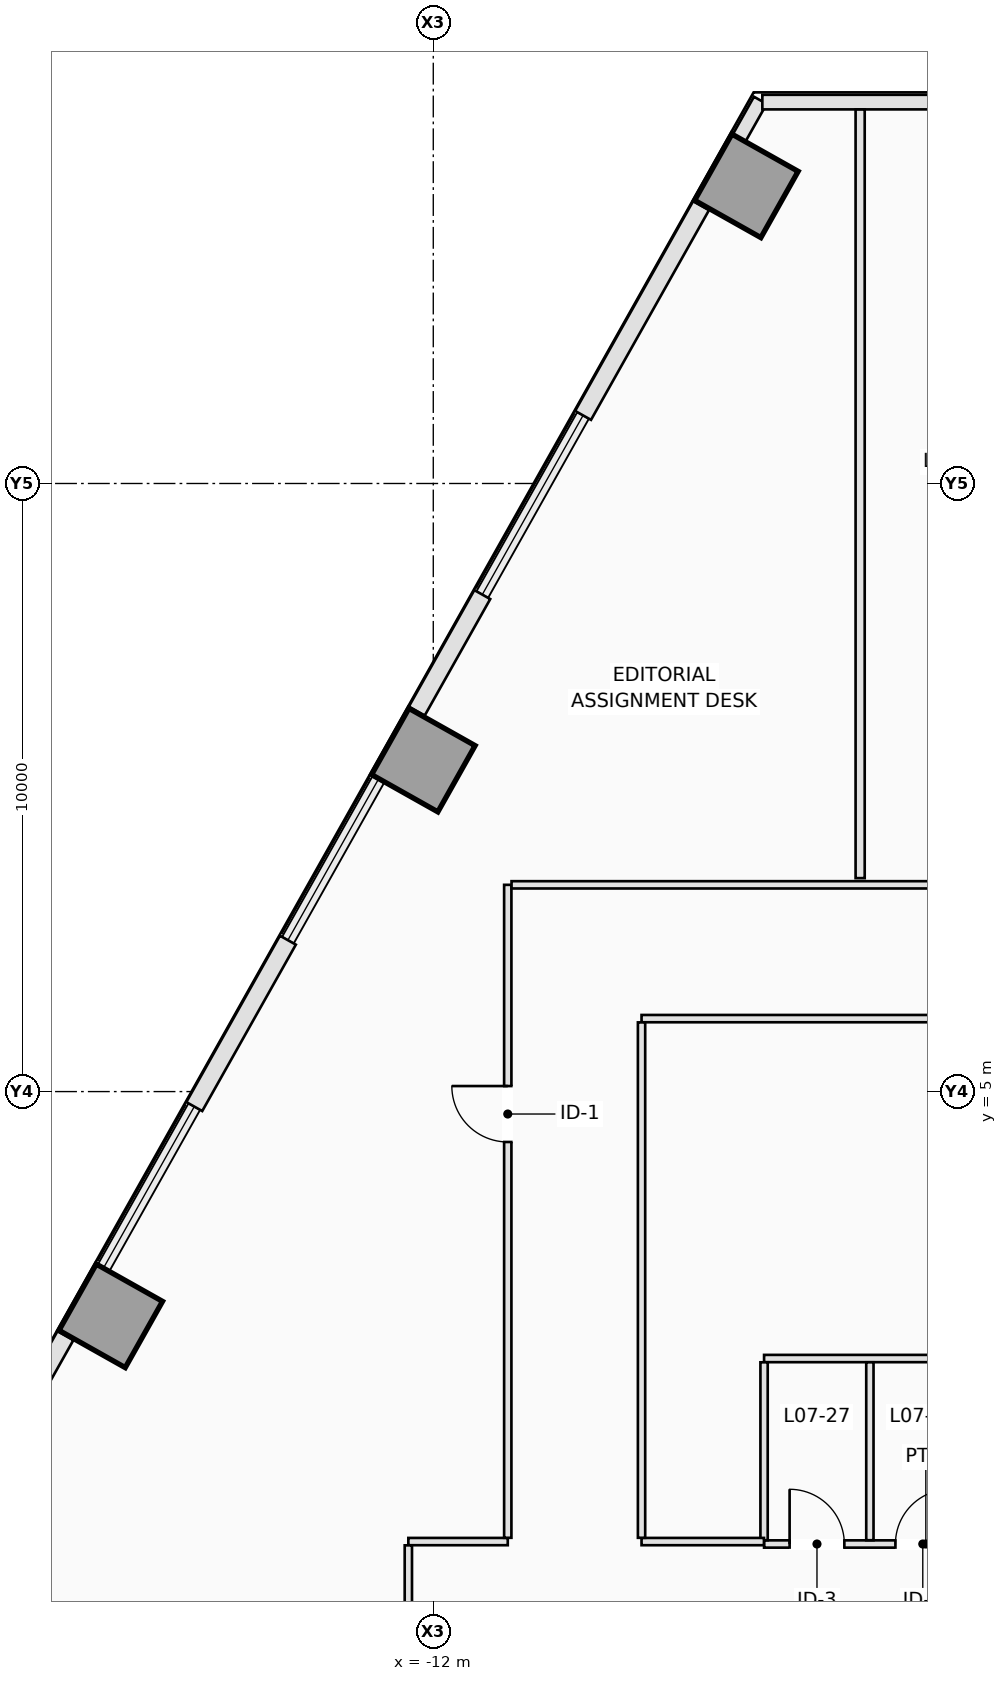
"""IFC4 building model, lengths in metres.
Left out: names, types, materials, properties, quantities, classifications, styles, units other than length and angle.
Written with IfcOpenShell. Run it as: python <this file> out.ifc"""

import sys

from ifc_helpers import new_model, si_unit, direction, frame, frame_2d, origin, origin_2d, place, context, subcontext, project, spatial, rectangle, extrude, element, fill, save


model = new_model("IFC4")
c1 = context("Model", 3, precision=1e-05, world=origin(), true_north=direction((0.0, 1.0)))
c2 = subcontext(c1, "Body", "Model", "MODEL_VIEW")
j1 = project(units=[si_unit("LENGTHUNIT", "METRE"), si_unit("PLANEANGLEUNIT", "RADIAN")], contexts=[c1])
p1 = place(None, origin())
s1 = spatial("IfcSite", under=j1, at=p1, CompositionType="ELEMENT")
p2 = place(p1, origin())
s2 = spatial("IfcBuilding", under=s1, at=p2, CompositionType="ELEMENT")
p3 = place(p2, frame((0.0, 0.0, 31.1)))
s3 = spatial("IfcBuildingStorey", under=s2, at=p3, CompositionType="ELEMENT", Elevation=31.1)
for number, where, z_axis, x_axis in (
    (1, (-6.851, 19.895, 0.0), (0.0, 0.0, 1.0), (-0.872, 0.49, 0.0)),
    (2, (-12.163, 10.451, 0.0), (0.0, 0.0, 1.0), (-0.872, 0.49, 0.0)),
    (3, (-17.304, 1.312, 0.0), (0.0, 0.0, 1.0), (-0.872, 0.49, 0.0)),
):
    element("IfcColumn", number, at=place(p3, frame(where, z_axis=z_axis, x_axis=x_axis)), inside=s3, PredefinedType="COLUMN", context=c2, shape_type="SweptSolid", body=[
        extrude(rectangle(XDim=1.25, YDim=1.25, at=origin_2d()), origin(), (0.0, 0.0, 1.0), 3.5),
    ])
p4 = place(p3, frame((-6.969, 20.684, 0.0), z_axis=(0.0, 0.0, 1.0), x_axis=(0.490261239633, 0.871575537125, 0.0)))
e4 = element("IfcWall", 4, at=p4, inside=s3, PredefinedType="STANDARD", context=c2, shape_type="SweptSolid", body=[
    extrude(rectangle(XDim=0.708, YDim=0.24, at=frame_2d((0.354, 0.0))), origin(), (0.0, 0.0, 1.0), 3.25),
])
p5 = place(p3, frame((-19.127, -0.93, 0.0), z_axis=(0.0, 0.0, 1.0), x_axis=(0.490277063651, 0.871566635925, 0.0)))
e5 = element("IfcWall", 5, at=p5, inside=s3, PredefinedType="STANDARD", context=c2, shape_type="SweptSolid", body=[
    extrude(rectangle(XDim=2.198, YDim=0.3, at=frame_2d((1.099, 0.0))), origin(), (0.0, 0.0, 1.0), 3.25),
])
p6 = place(p3, frame((-12.271, 11.258, 0.0), z_axis=(0.0, 0.0, 1.0), x_axis=(0.490324540864, 0.871539927156, 0.0)))
e6 = element("IfcWall", 6, at=p6, inside=s3, PredefinedType="STANDARD", context=c2, shape_type="SweptSolid", body=[
    extrude(rectangle(XDim=2.197, YDim=0.3, at=frame_2d((1.099, 0.0))), origin(), (0.0, 0.0, 1.0), 3.25),
])
p7 = place(p3, frame((-9.537, 16.12, 0.0), z_axis=(0.0, 0.0, 1.0), x_axis=(0.490240735008, 0.871587070659, 0.0)))
e7 = element("IfcWall", 7, at=p7, inside=s3, PredefinedType="STANDARD", context=c2, shape_type="SweptSolid", body=[
    extrude(rectangle(XDim=3.957, YDim=0.3, at=frame_2d((1.979, 0.0))), origin(), (0.0, 0.0, 1.0), 3.25),
])
p8 = place(p3, frame((-15.93, 4.753, 0.0), z_axis=(0.0, 0.0, 1.0), x_axis=(0.490290775148, 0.871558922738, 0.0)))
e8 = element("IfcWall", 8, at=p8, inside=s3, PredefinedType="STANDARD", context=c2, shape_type="SweptSolid", body=[
    extrude(rectangle(XDim=3.14, YDim=0.3, at=frame_2d((1.57, 0.0))), origin(), (0.0, 0.0, 1.0), 3.25),
])
p9 = place(p3, frame((6.598, 21.272, 0.0), z_axis=(0.0, 0.0, 1.0), x_axis=(-1.0, 0.0, 0.0)))
e9 = element("IfcWall", 9, at=p9, inside=s3, PredefinedType="STANDARD", context=c2, shape_type="SweptSolid", body=[
    extrude(rectangle(XDim=13.187, YDim=0.24, at=frame_2d((6.593, 0.0))), origin(), (0.0, 0.0, 1.0), 3.25),
])
p10 = place(p9, frame((5.693, 0.0, 0.9)))
e10 = element("IfcOpeningElement", 10, at=p10, cuts=e9, PredefinedType="OPENING", context=c2, shape_type="SweptSolid", body=[
    extrude(rectangle(XDim=1.8, YDim=2.1, at=frame_2d((0.9, 1.05))), frame((0.0, 0.13, 0.0), z_axis=(0.0, -1.0, 0.0), x_axis=(1.0, 0.0, 0.0)), (0.0, 0.0, 1.0), 0.26),
])
p11 = place(p3, frame((-6.56, -2.44, 0.0), z_axis=(0.0, 0.0, 1.0), x_axis=(1.0, 0.0, 0.0)))
e11 = element("IfcWall", 11, at=p11, inside=s3, PredefinedType="PARTITIONING", context=c2, shape_type="SweptSolid", body=[
    extrude(rectangle(XDim=5.32, YDim=0.12, at=frame_2d((2.66, 0.0))), origin(), (0.0, 0.0, 1.0), 3.25),
])
p12 = place(p11, frame((0.42, 0.0, 0.0)))
e12 = element("IfcOpeningElement", 12, at=p12, cuts=e11, PredefinedType="OPENING", context=c2, shape_type="SweptSolid", body=[
    extrude(rectangle(XDim=0.9, YDim=2.12, at=frame_2d((0.45, 1.06))), frame((0.0, 0.07, 0.0), z_axis=(0.0, -1.0, 0.0), x_axis=(1.0, 0.0, 0.0)), (0.0, 0.0, 1.0), 0.14),
])
p13 = place(p11, frame((2.16, 0.0, 0.0)))
e13 = element("IfcOpeningElement", 13, at=p13, cuts=e11, PredefinedType="OPENING", context=c2, shape_type="SweptSolid", body=[
    extrude(rectangle(XDim=0.9, YDim=2.12, at=frame_2d((0.45, 1.06))), frame((0.0, 0.07, 0.0), z_axis=(0.0, -1.0, 0.0), x_axis=(1.0, 0.0, 0.0)), (0.0, 0.0, 1.0), 0.14),
])
p14 = place(p11, frame((3.92, 0.0, 0.0)))
e14 = element("IfcOpeningElement", 14, at=p14, cuts=e11, PredefinedType="OPENING", context=c2, shape_type="SweptSolid", body=[
    extrude(rectangle(XDim=0.9, YDim=2.12, at=frame_2d((0.45, 1.06))), frame((0.0, 0.07, 0.0), z_axis=(0.0, -1.0, 0.0), x_axis=(1.0, 0.0, 0.0)), (0.0, 0.0, 1.0), 0.14),
])
p15 = place(p3, frame((-6.56, 0.61, 0.0), z_axis=(0.0, 0.0, 1.0), x_axis=(1.0, 0.0, 0.0)))
e15 = element("IfcWall", 15, at=p15, inside=s3, PredefinedType="PARTITIONING", context=c2, shape_type="SweptSolid", body=[
    extrude(rectangle(XDim=5.32, YDim=0.12, at=frame_2d((2.66, 0.0))), origin(), (0.0, 0.0, 1.0), 3.25),
])
for number, where, z_axis, x_axis in (
    (16, (-6.56, -2.378, 0.0), (0.0, 0.0, 1.0), (0.0, 1.0, 0.0)),
    (17, (-4.82, -2.378, 0.0), (0.0, 0.0, 1.0), (0.0, 1.0, 0.0)),
):
    element("IfcWall", number, at=place(p3, frame(where, z_axis=z_axis, x_axis=x_axis)), inside=s3, PredefinedType="PARTITIONING", context=c2, shape_type="SweptSolid", body=[
        extrude(rectangle(XDim=2.926, YDim=0.12, at=frame_2d((1.463, 0.0))), origin(), (0.0, 0.0, 1.0), 3.25),
    ])
p16 = place(p3, frame((-12.41, -2.4, 0.0), z_axis=(0.0, 0.0, 1.0), x_axis=(1.0, 0.0, 0.0)))
e18 = element("IfcWall", 18, at=p16, inside=s3, PredefinedType="PARTITIONING", context=c2, shape_type="SweptSolid", body=[
    extrude(rectangle(XDim=1.635, YDim=0.12, at=frame_2d((0.817, 0.0))), origin(), (0.0, 0.0, 1.0), 3.25),
])
p17 = place(p3, frame((-10.775, -2.338, 0.0), z_axis=(0.0, 0.0, 1.0), x_axis=(0.0, 1.0, 0.0)))
e19 = element("IfcWall", 19, at=p17, inside=s3, PredefinedType="PARTITIONING", context=c2, shape_type="SweptSolid", body=[
    extrude(rectangle(XDim=10.738, YDim=0.12, at=frame_2d((5.369, 0.0))), origin(), (0.0, 0.0, 1.0), 3.25),
])
p18 = place(p17, frame((6.509, 0.0, 0.0)))
e20 = element("IfcOpeningElement", 20, at=p18, cuts=e19, PredefinedType="OPENING", context=c2, shape_type="SweptSolid", body=[
    extrude(rectangle(XDim=0.92, YDim=2.12, at=frame_2d((0.46, 1.06))), frame((0.0, 0.07, 0.0), z_axis=(0.0, -1.0, 0.0), x_axis=(1.0, 0.0, 0.0)), (0.0, 0.0, 1.0), 0.14),
])
p19 = place(p3, frame((-10.713, 8.4, 0.0), z_axis=(0.0, 0.0, 1.0), x_axis=(1.0, 0.0, 0.0)))
e21 = element("IfcWall", 21, at=p19, inside=s3, PredefinedType="PARTITIONING", context=c2, shape_type="SweptSolid", body=[
    extrude(rectangle(XDim=21.638, YDim=0.12, at=frame_2d((10.819, 0.0))), origin(), (0.0, 0.0, 1.0), 3.25),
])
p20 = place(p19, frame((6.86, 0.0, 0.0)))
e22 = element("IfcOpeningElement", 22, at=p20, cuts=e21, PredefinedType="OPENING", context=c2, shape_type="SweptSolid", body=[
    extrude(rectangle(XDim=0.92, YDim=2.12, at=frame_2d((0.46, 1.06))), frame((0.0, 0.07, 0.0), z_axis=(0.0, -1.0, 0.0), x_axis=(1.0, 0.0, 0.0)), (0.0, 0.0, 1.0), 0.14),
])
p21 = place(p19, frame((11.31, 0.0, 0.0)))
e23 = element("IfcOpeningElement", 23, at=p21, cuts=e21, PredefinedType="OPENING", context=c2, shape_type="SweptSolid", body=[
    extrude(rectangle(XDim=0.92, YDim=2.12, at=frame_2d((0.46, 1.06))), frame((0.0, 0.07, 0.0), z_axis=(0.0, -1.0, 0.0), x_axis=(1.0, 0.0, 0.0)), (0.0, 0.0, 1.0), 0.14),
])
p22 = place(p19, frame((17.243, 0.0, 0.0)))
e24 = element("IfcOpeningElement", 24, at=p22, cuts=e21, PredefinedType="OPENING", context=c2, shape_type="SweptSolid", body=[
    extrude(rectangle(XDim=0.92, YDim=2.12, at=frame_2d((0.46, 1.06))), frame((0.0, 0.07, 0.0), z_axis=(0.0, -1.0, 0.0), x_axis=(1.0, 0.0, 0.0)), (0.0, 0.0, 1.0), 0.14),
])
p23 = place(p3, frame((-12.41, -4.098, 0.0), z_axis=(0.0, 0.0, 1.0), x_axis=(0.0, 1.0, 0.0)))
e25 = element("IfcWall", 25, at=p23, inside=s3, PredefinedType="PARTITIONING", context=c2, shape_type="SweptSolid", body=[
    extrude(rectangle(XDim=1.636, YDim=0.12, at=frame_2d((0.818, 0.0))), origin(), (0.0, 0.0, 1.0), 3.25),
])
p24 = place(p3, frame((-8.575, -2.4, 0.0), z_axis=(0.0, 0.0, 1.0), x_axis=(1.0, 0.0, 0.0)))
e26 = element("IfcWall", 26, at=p24, inside=s3, PredefinedType="PARTITIONING", context=c2, shape_type="SweptSolid", body=[
    extrude(rectangle(XDim=2.013, YDim=0.12, at=frame_2d((1.006, 0.0))), origin(), (0.0, 0.0, 1.0), 3.25),
])
p25 = place(p3, frame((8.663, 6.2, 0.0), z_axis=(0.0, 0.0, 1.0), x_axis=(-1.0, 0.0, 0.0)))
e27 = element("IfcWall", 27, at=p25, inside=s3, PredefinedType="PARTITIONING", context=c2, shape_type="SweptSolid", body=[
    extrude(rectangle(XDim=17.238, YDim=0.12, at=frame_2d((8.619, 0.0))), origin(), (0.0, 0.0, 1.0), 3.25),
])
p26 = place(p3, frame((-8.575, 6.138, 0.0), z_axis=(0.0, 0.0, 1.0), x_axis=(0.0, -1.0, 0.0)))
e28 = element("IfcWall", 28, at=p26, inside=s3, PredefinedType="PARTITIONING", context=c2, shape_type="SweptSolid", body=[
    extrude(rectangle(XDim=8.476, YDim=0.12, at=frame_2d((4.238, 0.0))), origin(), (0.0, 0.0, 1.0), 3.25),
])
p27 = place(p3, frame((-4.98, 8.51, 0.0), z_axis=(0.0, 0.0, 1.0), x_axis=(0.0, 1.0, 0.0)))
e29 = element("IfcWall", 29, at=p27, inside=s3, PredefinedType="PARTITIONING", context=c2, shape_type="SweptSolid", body=[
    extrude(rectangle(XDim=12.64, YDim=0.15, at=frame_2d((6.32, 0.0))), origin(), (0.0, 0.0, 1.0), 3.25),
])
p28 = place(p12, origin())
e30 = element("IfcDoor", 30, at=p28, inside=s3, OperationType="SINGLE_SWING_LEFT", PredefinedType="DOOR", context=c2, shape_type="SweptSolid", body=[
    extrude(rectangle(XDim=0.9, YDim=2.12, at=frame_2d((0.45, 1.06))), frame((0.0, 0.025, 0.0), z_axis=(0.0, -1.0, 0.0), x_axis=(1.0, 0.0, 0.0)), (0.0, 0.0, 1.0), 0.05),
])
fill(e12, e30)
p29 = place(p13, origin())
e31 = element("IfcDoor", 31, at=p29, inside=s3, OperationType="SINGLE_SWING_RIGHT", PredefinedType="DOOR", context=c2, shape_type="SweptSolid", body=[
    extrude(rectangle(XDim=0.9, YDim=2.12, at=frame_2d((0.45, 1.06))), frame((0.0, 0.025, 0.0), z_axis=(0.0, -1.0, 0.0), x_axis=(1.0, 0.0, 0.0)), (0.0, 0.0, 1.0), 0.05),
])
fill(e13, e31)
p30 = place(p18, origin())
e32 = element("IfcDoor", 32, at=p30, inside=s3, OperationType="SINGLE_SWING_RIGHT", PredefinedType="DOOR", context=c2, shape_type="SweptSolid", body=[
    extrude(rectangle(XDim=0.92, YDim=2.12, at=frame_2d((0.46, 1.06))), frame((0.0, 0.025, 0.0), z_axis=(0.0, -1.0, 0.0), x_axis=(1.0, 0.0, 0.0)), (0.0, 0.0, 1.0), 0.05),
])
fill(e20, e32)
save(model, sys.argv[1])
